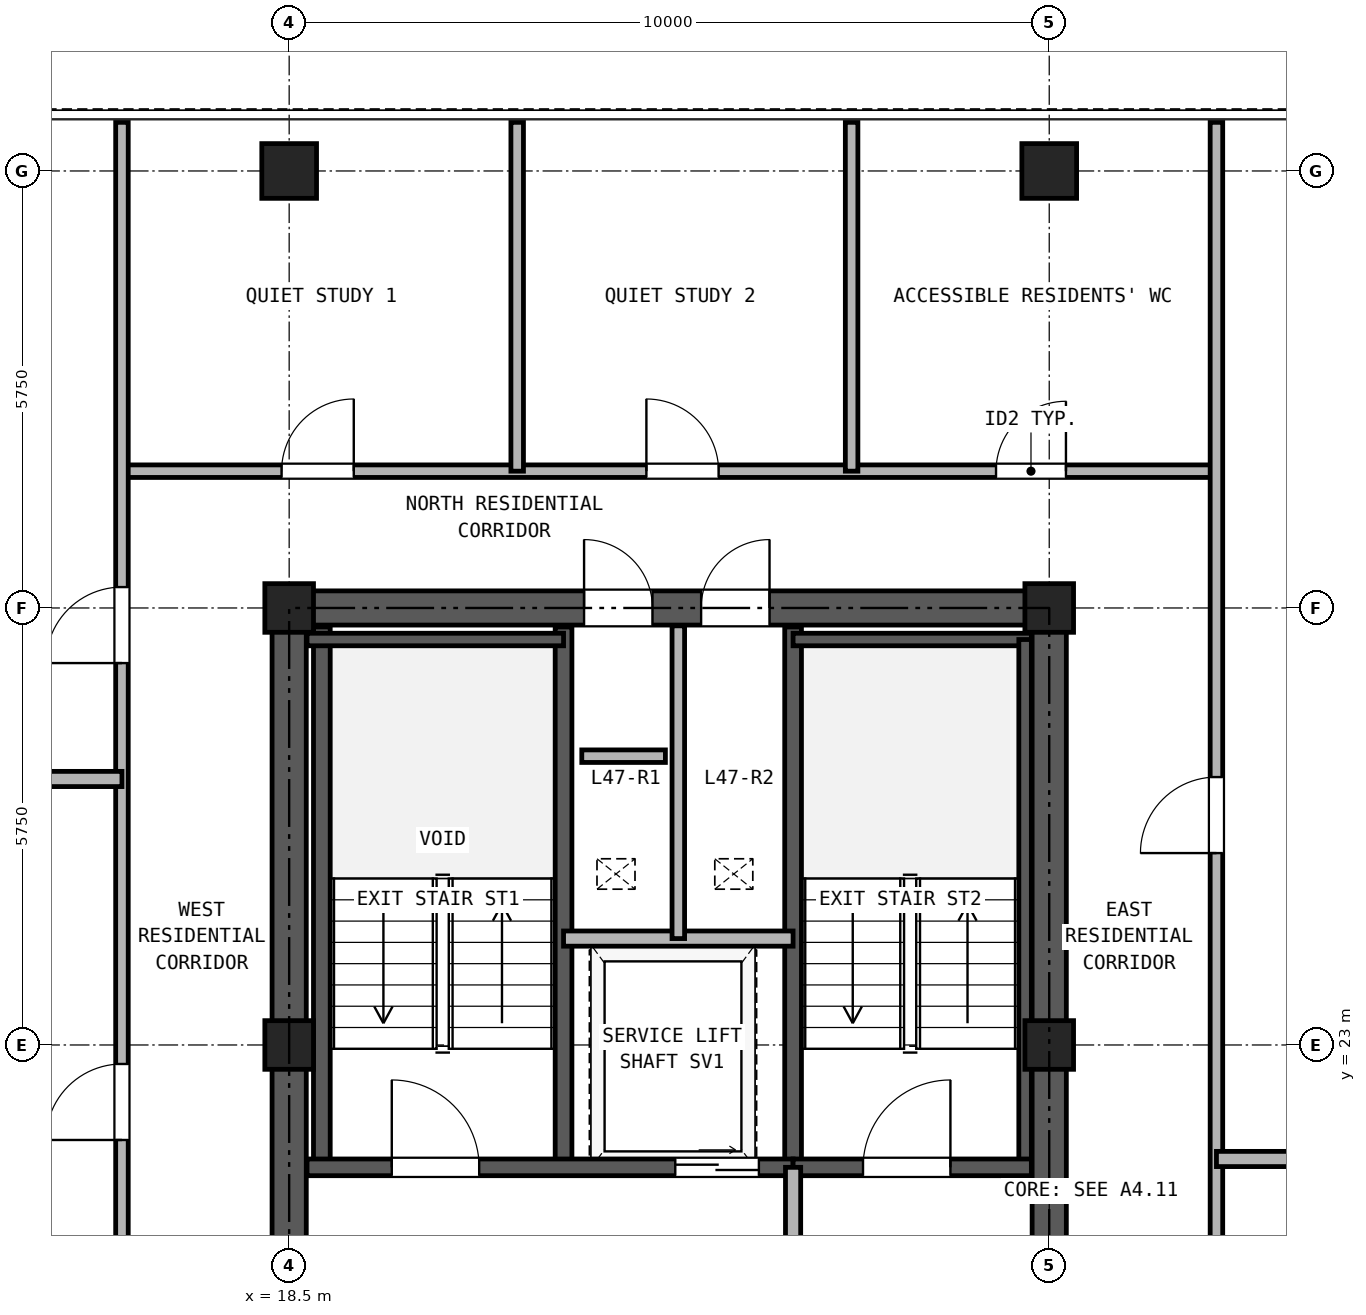
"""IFC4 building model, lengths in metres.
Left out: names, types, materials, properties, quantities, classifications, styles, units other than length and angle.
Written with IfcOpenShell. Run it as: python <this file> out.ifc"""

import sys

from ifc_helpers import new_model, si_unit, direction, frame, frame_2d, origin, origin_2d, place, context, subcontext, project, spatial, rectangle, hollow_rectangle, extrude, source, transform, mapped, element, fill, save


model = new_model("IFC4")
c1 = context("Model", 3, precision=1e-05, world=origin(), true_north=direction((0.0, 1.0)))
c2 = subcontext(c1, "Body", "Model", "MODEL_VIEW")
j1 = project(units=[si_unit("LENGTHUNIT", "METRE"), si_unit("PLANEANGLEUNIT", "RADIAN")], contexts=[c1])
p1 = place(None, origin())
s1 = spatial("IfcSite", under=j1, at=p1, CompositionType="ELEMENT")
p2 = place(p1, origin())
s2 = spatial("IfcBuilding", under=s1, at=p2, CompositionType="ELEMENT")
p3 = place(p2, frame((0.0, 0.0, 168.9)))
s3 = spatial("IfcBuildingStorey", under=s2, at=p3, CompositionType="ELEMENT", Elevation=168.9)
m1 = source(origin(), c2, "Body", "SweptSolid", [
    extrude(hollow_rectangle(XDim=0.72, YDim=0.72, WallThickness=0.04, at=origin_2d()), origin(), (0.0, 0.0, 1.0), 2.95),
])
for number, where, z_axis, x_axis in (
    (1, (18.5, 34.5, 0.0), (0.0, 0.0, 1.0), (1.0, 0.0, 0.0)),
    (2, (28.5, 34.5, 0.0), (0.0, 0.0, 1.0), (1.0, 0.0, 0.0)),
):
    element("IfcColumn", number, at=place(p3, frame(where, z_axis=z_axis, x_axis=x_axis)), inside=s3, PredefinedType="COLUMN", context=c2, shape_type="MappedRepresentation", body=[
        mapped(m1, transform((0.0, 0.0, 0.0), x_axis=(1.0, 0.0, 0.0), y_axis=(0.0, 1.0, 0.0), z_axis=(0.0, 0.0, 1.0), scale=1.0)),
    ])
m2 = source(origin(), c2, "Body", "SweptSolid", [
    extrude(hollow_rectangle(XDim=0.64, YDim=0.64, WallThickness=0.035, at=origin_2d()), origin(), (0.0, 0.0, 1.0), 2.95),
])
for number, where, z_axis, x_axis in (
    (3, (18.5, 23.0, 0.0), (0.0, 0.0, 1.0), (1.0, 0.0, 0.0)),
    (4, (18.5, 28.75, 0.0), (0.0, 0.0, 1.0), (1.0, 0.0, 0.0)),
    (5, (28.5, 23.0, 0.0), (0.0, 0.0, 1.0), (1.0, 0.0, 0.0)),
    (6, (28.5, 28.75, 0.0), (0.0, 0.0, 1.0), (1.0, 0.0, 0.0)),
):
    element("IfcColumn", number, at=place(p3, frame(where, z_axis=z_axis, x_axis=x_axis)), inside=s3, PredefinedType="COLUMN", context=c2, shape_type="MappedRepresentation", body=[
        mapped(m2, transform((0.0, 0.0, 0.0), x_axis=(1.0, 0.0, 0.0), y_axis=(0.0, 1.0, 0.0), z_axis=(0.0, 0.0, 1.0), scale=1.0)),
    ])
p4 = place(p3, frame((18.275, 28.75, 0.0), z_axis=(0.0, 0.0, 1.0), x_axis=(1.0, 0.0, 0.0)))
e7 = element("IfcWall", 7, at=p4, inside=s3, PredefinedType="SHEAR", context=c2, shape_type="SweptSolid", body=[
    extrude(rectangle(XDim=10.45, YDim=0.45, at=frame_2d((5.225, 0.0))), origin(), (0.0, 0.0, 1.0), 2.95),
])
p5 = place(p4, frame((4.105, 0.0, 0.0)))
e8 = element("IfcOpeningElement", 8, at=p5, cuts=e7, PredefinedType="OPENING", context=c2, shape_type="SweptSolid", body=[
    extrude(rectangle(XDim=0.9, YDim=2.05, at=frame_2d((0.45, 1.025))), frame((0.0, 0.235, 0.0), z_axis=(0.0, -1.0, 0.0), x_axis=(1.0, 0.0, 0.0)), (0.0, 0.0, 1.0), 0.47),
])
p6 = place(p4, frame((5.645, 0.0, 0.0)))
e9 = element("IfcOpeningElement", 9, at=p6, cuts=e7, PredefinedType="OPENING", context=c2, shape_type="SweptSolid", body=[
    extrude(rectangle(XDim=0.9, YDim=2.05, at=frame_2d((0.45, 1.025))), frame((0.0, 0.235, 0.0), z_axis=(0.0, -1.0, 0.0), x_axis=(1.0, 0.0, 0.0)), (0.0, 0.0, 1.0), 0.47),
])
p7 = place(p3, frame((18.5, 11.725, 0.0), z_axis=(0.0, 0.0, 1.0), x_axis=(0.0, 1.0, 0.0)))
e10 = element("IfcWall", 10, at=p7, inside=s3, PredefinedType="SHEAR", context=c2, shape_type="SweptSolid", body=[
    extrude(rectangle(XDim=16.8, YDim=0.45, at=frame_2d((8.4, 0.0))), origin(), (0.0, 0.0, 1.0), 2.95),
])
p8 = place(p7, frame((7.425, 0.0, 0.0)))
e11 = element("IfcOpeningElement", 11, at=p8, cuts=e10, PredefinedType="OPENING", context=c2, shape_type="SweptSolid", body=[
    extrude(rectangle(XDim=1.15, YDim=2.2, at=frame_2d((0.575, 1.1))), frame((0.0, 0.235, 0.0), z_axis=(0.0, -1.0, 0.0), x_axis=(1.0, 0.0, 0.0)), (0.0, 0.0, 1.0), 0.47),
])
p9 = place(p3, frame((28.5, 11.725, 0.0), z_axis=(0.0, 0.0, 1.0), x_axis=(0.0, 1.0, 0.0)))
e12 = element("IfcWall", 12, at=p9, inside=s3, PredefinedType="SHEAR", context=c2, shape_type="SweptSolid", body=[
    extrude(rectangle(XDim=16.8, YDim=0.45, at=frame_2d((8.4, 0.0))), origin(), (0.0, 0.0, 1.0), 2.95),
])
p10 = place(p9, frame((7.425, 0.0, 0.0)))
e13 = element("IfcOpeningElement", 13, at=p10, cuts=e12, PredefinedType="OPENING", context=c2, shape_type="SweptSolid", body=[
    extrude(rectangle(XDim=1.15, YDim=2.2, at=frame_2d((0.575, 1.1))), frame((0.0, 0.235, 0.0), z_axis=(0.0, -1.0, 0.0), x_axis=(1.0, 0.0, 0.0)), (0.0, 0.0, 1.0), 0.47),
])
for number, where, z_axis, x_axis in (
    (14, (18.93, 21.39, 0.0), (0.0, 0.0, 1.0), (0.0, 1.0, 0.0)),
    (15, (22.11, 21.39, 0.0), (0.0, 0.0, 1.0), (0.0, 1.0, 0.0)),
    (16, (25.13, 21.39, 0.0), (0.0, 0.0, 1.0), (0.0, 1.0, 0.0)),
):
    element("IfcWall", number, at=place(p3, frame(where, z_axis=z_axis, x_axis=x_axis)), inside=s3, PredefinedType="SOLIDWALL", context=c2, shape_type="SweptSolid", body=[
        extrude(rectangle(XDim=7.11, YDim=0.22, at=frame_2d((3.555, 0.0))), origin(), (0.0, 0.0, 1.0), 2.95),
    ])
p11 = place(p3, frame((18.735, 28.335, 0.0), z_axis=(0.0, 0.0, 1.0), x_axis=(1.0, 0.0, 0.0)))
e17 = element("IfcWall", 17, at=p11, inside=s3, PredefinedType="PARTITIONING", context=c2, shape_type="SweptSolid", body=[
    extrude(rectangle(XDim=3.375, YDim=0.165, at=frame_2d((1.688, 0.0))), origin(), (0.0, 0.0, 1.0), 2.95),
])
p12 = place(p3, frame((25.13, 28.335, 0.0), z_axis=(0.0, 0.0, 1.0), x_axis=(1.0, 0.0, 0.0)))
e18 = element("IfcWall", 18, at=p12, inside=s3, PredefinedType="PARTITIONING", context=c2, shape_type="SweptSolid", body=[
    extrude(rectangle(XDim=3.135, YDim=0.165, at=frame_2d((1.567, 0.0))), origin(), (0.0, 0.0, 1.0), 2.95),
])
p13 = place(p3, frame((28.183, 21.39, 0.0), z_axis=(0.0, 0.0, 1.0), x_axis=(0.0, 1.0, 0.0)))
e19 = element("IfcWall", 19, at=p13, inside=s3, PredefinedType="PARTITIONING", context=c2, shape_type="SweptSolid", body=[
    extrude(rectangle(XDim=6.945, YDim=0.165, at=frame_2d((3.473, 0.0))), origin(), (0.0, 0.0, 1.0), 2.95),
])
p14 = place(p3, frame((18.735, 21.39, 0.0), z_axis=(0.0, 0.0, 1.0), x_axis=(1.0, 0.0, 0.0)))
e20 = element("IfcWall", 20, at=p14, inside=s3, PredefinedType="SOLIDWALL", context=c2, shape_type="SweptSolid", body=[
    extrude(rectangle(XDim=6.395, YDim=0.22, at=frame_2d((3.197, 0.0))), origin(), (0.0, 0.0, 1.0), 2.95),
])
p15 = place(p14, frame((1.115, 0.0, 0.0)))
e21 = element("IfcOpeningElement", 21, at=p15, cuts=e20, PredefinedType="OPENING", context=c2, shape_type="SweptSolid", body=[
    extrude(rectangle(XDim=1.15, YDim=2.2, at=frame_2d((0.575, 1.1))), frame((0.0, 0.12, 0.0), z_axis=(0.0, -1.0, 0.0), x_axis=(1.0, 0.0, 0.0)), (0.0, 0.0, 1.0), 0.24),
])
p16 = place(p14, frame((4.845, 0.0, 0.0)))
e22 = element("IfcOpeningElement", 22, at=p16, cuts=e20, PredefinedType="OPENING", context=c2, shape_type="SweptSolid", body=[
    extrude(rectangle(XDim=1.1, YDim=2.25, at=frame_2d((0.55, 1.125))), frame((0.0, 0.12, 0.0), z_axis=(0.0, -1.0, 0.0), x_axis=(1.0, 0.0, 0.0)), (0.0, 0.0, 1.0), 0.24),
])
p17 = place(p3, frame((25.13, 21.39, 0.0), z_axis=(0.0, 0.0, 1.0), x_axis=(1.0, 0.0, 0.0)))
e23 = element("IfcWall", 23, at=p17, inside=s3, PredefinedType="SOLIDWALL", context=c2, shape_type="SweptSolid", body=[
    extrude(rectangle(XDim=3.135, YDim=0.22, at=frame_2d((1.567, 0.0))), origin(), (0.0, 0.0, 1.0), 2.95),
])
p18 = place(p17, frame((0.92, 0.0, 0.0)))
e24 = element("IfcOpeningElement", 24, at=p18, cuts=e23, PredefinedType="OPENING", context=c2, shape_type="SweptSolid", body=[
    extrude(rectangle(XDim=1.15, YDim=2.2, at=frame_2d((0.575, 1.1))), frame((0.0, 0.12, 0.0), z_axis=(0.0, -1.0, 0.0), x_axis=(1.0, 0.0, 0.0)), (0.0, 0.0, 1.0), 0.24),
])
p19 = place(p3, frame((22.11, 24.4, 0.0), z_axis=(0.0, 0.0, 1.0), x_axis=(1.0, 0.0, 0.0)))
e25 = element("IfcWall", 25, at=p19, inside=s3, PredefinedType="PARTITIONING", context=c2, shape_type="SweptSolid", body=[
    extrude(rectangle(XDim=3.02, YDim=0.2, at=frame_2d((1.51, 0.0))), origin(), (0.0, 0.0, 1.0), 2.95),
])
p20 = place(p3, frame((23.62, 24.4, 0.0), z_axis=(0.0, 0.0, 1.0), x_axis=(0.0, 1.0, 0.0)))
e26 = element("IfcWall", 26, at=p20, inside=s3, PredefinedType="PARTITIONING", context=c2, shape_type="SweptSolid", body=[
    extrude(rectangle(XDim=4.115, YDim=0.165, at=frame_2d((2.058, 0.0))), origin(), (0.0, 0.0, 1.0), 2.95),
])
p21 = place(p3, frame((25.13, 18.0, 0.0), z_axis=(0.0, 0.0, 1.0), x_axis=(0.0, 1.0, 0.0)))
e27 = element("IfcWall", 27, at=p21, inside=s3, PredefinedType="PARTITIONING", context=c2, shape_type="SweptSolid", body=[
    extrude(rectangle(XDim=3.39, YDim=0.2, at=frame_2d((1.695, 0.0))), origin(), (0.0, 0.0, 1.0), 2.95),
])
p22 = place(p21, frame((1.1, 0.0, 0.0)))
e28 = element("IfcOpeningElement", 28, at=p22, cuts=e27, PredefinedType="OPENING", context=c2, shape_type="SweptSolid", body=[
    extrude(rectangle(XDim=1.15, YDim=2.2, at=frame_2d((0.575, 1.1))), frame((0.0, 0.11, 0.0), z_axis=(0.0, -1.0, 0.0), x_axis=(1.0, 0.0, 0.0)), (0.0, 0.0, 1.0), 0.22),
])
p23 = place(p3, frame((16.3, 30.55, 0.0), z_axis=(0.0, 0.0, 1.0), x_axis=(1.0, 0.0, 0.0)))
e29 = element("IfcWall", 29, at=p23, inside=s3, PredefinedType="PARTITIONING", context=c2, shape_type="SweptSolid", body=[
    extrude(rectangle(XDim=14.4, YDim=0.165, at=frame_2d((7.2, 0.0))), origin(), (0.0, 0.0, 1.0), 2.95),
])
p24 = place(p23, frame((2.1, 0.0, 0.0)))
e30 = element("IfcOpeningElement", 30, at=p24, cuts=e29, PredefinedType="OPENING", context=c2, shape_type="SweptSolid", body=[
    extrude(rectangle(XDim=0.95, YDim=2.15, at=frame_2d((0.475, 1.075))), frame((0.0, 0.093, 0.0), z_axis=(0.0, -1.0, 0.0), x_axis=(1.0, 0.0, 0.0)), (0.0, 0.0, 1.0), 0.185),
])
p25 = place(p23, frame((6.9, 0.0, 0.0)))
e31 = element("IfcOpeningElement", 31, at=p25, cuts=e29, PredefinedType="OPENING", context=c2, shape_type="SweptSolid", body=[
    extrude(rectangle(XDim=0.95, YDim=2.15, at=frame_2d((0.475, 1.075))), frame((0.0, 0.093, 0.0), z_axis=(0.0, -1.0, 0.0), x_axis=(1.0, 0.0, 0.0)), (0.0, 0.0, 1.0), 0.185),
])
p26 = place(p23, frame((11.5, 0.0, 0.0)))
e32 = element("IfcOpeningElement", 32, at=p26, cuts=e29, PredefinedType="OPENING", context=c2, shape_type="SweptSolid", body=[
    extrude(rectangle(XDim=0.92, YDim=2.1, at=frame_2d((0.46, 1.05))), frame((0.0, 0.093, 0.0), z_axis=(0.0, -1.0, 0.0), x_axis=(1.0, 0.0, 0.0)), (0.0, 0.0, 1.0), 0.185),
])
p27 = place(p3, frame((16.3, 11.45, 0.0), z_axis=(0.0, 0.0, 1.0), x_axis=(0.0, 1.0, 0.0)))
e33 = element("IfcWall", 33, at=p27, inside=s3, PredefinedType="PARTITIONING", context=c2, shape_type="SweptSolid", body=[
    extrude(rectangle(XDim=23.69, YDim=0.165, at=frame_2d((11.845, 0.0))), origin(), (0.0, 0.0, 1.0), 2.95),
])
p28 = place(p27, frame((2.775, 0.0, 0.0)))
e34 = element("IfcOpeningElement", 34, at=p28, cuts=e33, PredefinedType="OPENING", context=c2, shape_type="SweptSolid", body=[
    extrude(rectangle(XDim=1.0, YDim=2.15, at=frame_2d((0.5, 1.075))), frame((0.0, 0.093, 0.0), z_axis=(0.0, -1.0, 0.0), x_axis=(1.0, 0.0, 0.0)), (0.0, 0.0, 1.0), 0.185),
])
p29 = place(p27, frame((10.3, 0.0, 0.0)))
e35 = element("IfcOpeningElement", 35, at=p29, cuts=e33, PredefinedType="OPENING", context=c2, shape_type="SweptSolid", body=[
    extrude(rectangle(XDim=1.0, YDim=2.15, at=frame_2d((0.5, 1.075))), frame((0.0, 0.093, 0.0), z_axis=(0.0, -1.0, 0.0), x_axis=(1.0, 0.0, 0.0)), (0.0, 0.0, 1.0), 0.185),
])
p30 = place(p27, frame((16.575, 0.0, 0.0)))
e36 = element("IfcOpeningElement", 36, at=p30, cuts=e33, PredefinedType="OPENING", context=c2, shape_type="SweptSolid", body=[
    extrude(rectangle(XDim=1.0, YDim=2.15, at=frame_2d((0.5, 1.075))), frame((0.0, 0.093, 0.0), z_axis=(0.0, -1.0, 0.0), x_axis=(1.0, 0.0, 0.0)), (0.0, 0.0, 1.0), 0.185),
])
p31 = place(p3, frame((30.7, 11.45, 0.0), z_axis=(0.0, 0.0, 1.0), x_axis=(0.0, 1.0, 0.0)))
e37 = element("IfcWall", 37, at=p31, inside=s3, PredefinedType="PARTITIONING", context=c2, shape_type="SweptSolid", body=[
    extrude(rectangle(XDim=23.69, YDim=0.165, at=frame_2d((11.845, 0.0))), origin(), (0.0, 0.0, 1.0), 2.95),
])
p32 = place(p31, frame((4.525, 0.0, 0.0)))
e38 = element("IfcOpeningElement", 38, at=p32, cuts=e37, PredefinedType="OPENING", context=c2, shape_type="SweptSolid", body=[
    extrude(rectangle(XDim=1.0, YDim=2.15, at=frame_2d((0.5, 1.075))), frame((0.0, 0.093, 0.0), z_axis=(0.0, -1.0, 0.0), x_axis=(1.0, 0.0, 0.0)), (0.0, 0.0, 1.0), 0.185),
])
p33 = place(p31, frame((14.075, 0.0, 0.0)))
e39 = element("IfcOpeningElement", 39, at=p33, cuts=e37, PredefinedType="OPENING", context=c2, shape_type="SweptSolid", body=[
    extrude(rectangle(XDim=1.0, YDim=2.15, at=frame_2d((0.5, 1.075))), frame((0.0, 0.093, 0.0), z_axis=(0.0, -1.0, 0.0), x_axis=(1.0, 0.0, 0.0)), (0.0, 0.0, 1.0), 0.185),
])
p34 = place(p3, frame((0.16, 26.5, 0.0), z_axis=(0.0, 0.0, 1.0), x_axis=(1.0, 0.0, 0.0)))
e40 = element("IfcWall", 40, at=p34, inside=s3, PredefinedType="PARTITIONING", context=c2, shape_type="SweptSolid", body=[
    extrude(rectangle(XDim=16.14, YDim=0.2, at=frame_2d((8.07, 0.0))), origin(), (0.0, 0.0, 1.0), 2.95),
])
p35 = place(p3, frame((30.7, 21.5, 0.0), z_axis=(0.0, 0.0, 1.0), x_axis=(1.0, 0.0, 0.0)))
e41 = element("IfcWall", 41, at=p35, inside=s3, PredefinedType="PARTITIONING", context=c2, shape_type="SweptSolid", body=[
    extrude(rectangle(XDim=10.94, YDim=0.2, at=frame_2d((5.47, 0.0))), origin(), (0.0, 0.0, 1.0), 2.95),
])
for number, where, z_axis, x_axis in (
    (42, (21.5, 30.55, 0.0), (0.0, 0.0, 1.0), (0.0, 1.0, 0.0)),
    (43, (25.9, 30.55, 0.0), (0.0, 0.0, 1.0), (0.0, 1.0, 0.0)),
):
    element("IfcWall", number, at=place(p3, frame(where, z_axis=z_axis, x_axis=x_axis)), inside=s3, PredefinedType="PARTITIONING", context=c2, shape_type="SweptSolid", body=[
        extrude(rectangle(XDim=4.59, YDim=0.165, at=frame_2d((2.295, 0.0))), origin(), (0.0, 0.0, 1.0), 2.95),
    ])
p36 = place(p3, frame((22.35, 26.8, 0.0), z_axis=(0.0, 0.0, 1.0), x_axis=(1.0, 0.0, 0.0)))
e44 = element("IfcWall", 44, at=p36, inside=s3, PredefinedType="PARTITIONING", context=c2, shape_type="SweptSolid", body=[
    extrude(rectangle(XDim=1.1, YDim=0.165, at=frame_2d((0.55, 0.0))), origin(), (0.0, 0.0, 1.0), 2.95),
])
p37 = place(p15, frame((1.15, 0.0, 0.0), z_axis=(0.0, 0.0, 1.0), x_axis=(-1.0, 0.0, 0.0)))
e45 = element("IfcDoor", 45, at=p37, inside=s3, OperationType="SINGLE_SWING_LEFT", PredefinedType="DOOR", context=c2, shape_type="SweptSolid", body=[
    extrude(rectangle(XDim=1.15, YDim=2.2, at=frame_2d((0.575, 1.1))), frame((0.0, 0.025, 0.0), z_axis=(0.0, -1.0, 0.0), x_axis=(1.0, 0.0, 0.0)), (0.0, 0.0, 1.0), 0.05),
])
fill(e21, e45)
p38 = place(p18, frame((1.15, 0.0, 0.0), z_axis=(0.0, 0.0, 1.0), x_axis=(-1.0, 0.0, 0.0)))
e46 = element("IfcDoor", 46, at=p38, inside=s3, OperationType="SINGLE_SWING_RIGHT", PredefinedType="DOOR", context=c2, shape_type="SweptSolid", body=[
    extrude(rectangle(XDim=1.15, YDim=2.2, at=frame_2d((0.575, 1.1))), frame((0.0, 0.025, 0.0), z_axis=(0.0, -1.0, 0.0), x_axis=(1.0, 0.0, 0.0)), (0.0, 0.0, 1.0), 0.05),
])
fill(e24, e46)
p39 = place(p16, frame((1.1, 0.0, 0.0), z_axis=(0.0, 0.0, 1.0), x_axis=(-1.0, 0.0, 0.0)))
e47 = element("IfcDoor", 47, at=p39, inside=s3, OperationType="DOUBLE_DOOR_SLIDING", PredefinedType="DOOR", context=c2, shape_type="SweptSolid", body=[
    extrude(rectangle(XDim=1.1, YDim=2.25, at=frame_2d((0.55, 1.125))), frame((0.0, 0.025, 0.0), z_axis=(0.0, -1.0, 0.0), x_axis=(1.0, 0.0, 0.0)), (0.0, 0.0, 1.0), 0.05),
])
fill(e22, e47)
p40 = place(p5, origin())
e48 = element("IfcDoor", 48, at=p40, inside=s3, OperationType="SINGLE_SWING_LEFT", PredefinedType="DOOR", context=c2, shape_type="SweptSolid", body=[
    extrude(rectangle(XDim=0.9, YDim=2.05, at=frame_2d((0.45, 1.025))), frame((0.0, 0.025, 0.0), z_axis=(0.0, -1.0, 0.0), x_axis=(1.0, 0.0, 0.0)), (0.0, 0.0, 1.0), 0.05),
])
fill(e8, e48)
p41 = place(p6, origin())
e49 = element("IfcDoor", 49, at=p41, inside=s3, OperationType="SINGLE_SWING_RIGHT", PredefinedType="DOOR", context=c2, shape_type="SweptSolid", body=[
    extrude(rectangle(XDim=0.9, YDim=2.05, at=frame_2d((0.45, 1.025))), frame((0.0, 0.025, 0.0), z_axis=(0.0, -1.0, 0.0), x_axis=(1.0, 0.0, 0.0)), (0.0, 0.0, 1.0), 0.05),
])
fill(e9, e49)
p42 = place(p29, origin())
e50 = element("IfcDoor", 50, at=p42, inside=s3, OperationType="SINGLE_SWING_LEFT", PredefinedType="DOOR", context=c2, shape_type="SweptSolid", body=[
    extrude(rectangle(XDim=1.0, YDim=2.15, at=frame_2d((0.5, 1.075))), frame((0.0, 0.025, 0.0), z_axis=(0.0, -1.0, 0.0), x_axis=(1.0, 0.0, 0.0)), (0.0, 0.0, 1.0), 0.05),
])
fill(e35, e50)
p43 = place(p30, origin())
e51 = element("IfcDoor", 51, at=p43, inside=s3, OperationType="SINGLE_SWING_LEFT", PredefinedType="DOOR", context=c2, shape_type="SweptSolid", body=[
    extrude(rectangle(XDim=1.0, YDim=2.15, at=frame_2d((0.5, 1.075))), frame((0.0, 0.025, 0.0), z_axis=(0.0, -1.0, 0.0), x_axis=(1.0, 0.0, 0.0)), (0.0, 0.0, 1.0), 0.05),
])
fill(e36, e51)
p44 = place(p33, frame((1.0, 0.0, 0.0), z_axis=(0.0, 0.0, 1.0), x_axis=(-1.0, 0.0, 0.0)))
e52 = element("IfcDoor", 52, at=p44, inside=s3, OperationType="SINGLE_SWING_LEFT", PredefinedType="DOOR", context=c2, shape_type="SweptSolid", body=[
    extrude(rectangle(XDim=1.0, YDim=2.15, at=frame_2d((0.5, 1.075))), frame((0.0, 0.025, 0.0), z_axis=(0.0, -1.0, 0.0), x_axis=(1.0, 0.0, 0.0)), (0.0, 0.0, 1.0), 0.05),
])
fill(e39, e52)
p45 = place(p24, origin())
e53 = element("IfcDoor", 53, at=p45, inside=s3, OperationType="SINGLE_SWING_RIGHT", PredefinedType="DOOR", context=c2, shape_type="SweptSolid", body=[
    extrude(rectangle(XDim=0.95, YDim=2.15, at=frame_2d((0.475, 1.075))), frame((0.0, 0.025, 0.0), z_axis=(0.0, -1.0, 0.0), x_axis=(1.0, 0.0, 0.0)), (0.0, 0.0, 1.0), 0.05),
])
fill(e30, e53)
p46 = place(p25, origin())
e54 = element("IfcDoor", 54, at=p46, inside=s3, OperationType="SINGLE_SWING_LEFT", PredefinedType="DOOR", context=c2, shape_type="SweptSolid", body=[
    extrude(rectangle(XDim=0.95, YDim=2.15, at=frame_2d((0.475, 1.075))), frame((0.0, 0.025, 0.0), z_axis=(0.0, -1.0, 0.0), x_axis=(1.0, 0.0, 0.0)), (0.0, 0.0, 1.0), 0.05),
])
fill(e31, e54)
p47 = place(p26, origin())
e55 = element("IfcDoor", 55, at=p47, inside=s3, OperationType="SINGLE_SWING_RIGHT", PredefinedType="DOOR", context=c2, shape_type="SweptSolid", body=[
    extrude(rectangle(XDim=0.92, YDim=2.1, at=frame_2d((0.46, 1.05))), frame((0.0, 0.025, 0.0), z_axis=(0.0, -1.0, 0.0), x_axis=(1.0, 0.0, 0.0)), (0.0, 0.0, 1.0), 0.05),
])
fill(e32, e55)
save(model, sys.argv[1])
